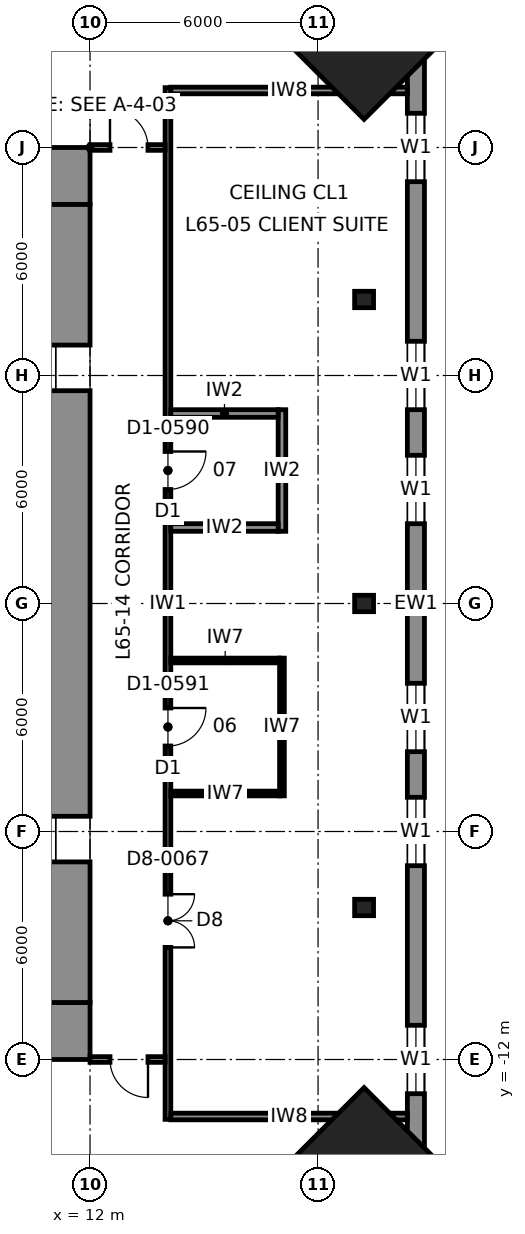
"""IFC4 building model, lengths in metres.
Left out: names, types, materials, properties, quantities, classifications, styles, units other than length and angle.
Written with IfcOpenShell. Run it as: python <this file> out.ifc"""

import sys

from ifc_helpers import new_model, si_unit, direction, frame, frame_2d, origin, origin_2d, place, context, subcontext, project, spatial, rectangle, i_section, extrude, element, fill, save


model = new_model("IFC4")
c1 = context("Model", 3, precision=1e-05, world=origin(), true_north=direction((0.0, 1.0)))
c2 = subcontext(c1, "Body", "Model", "MODEL_VIEW")
j1 = project(units=[si_unit("LENGTHUNIT", "METRE"), si_unit("PLANEANGLEUNIT", "RADIAN")], contexts=[c1])
p1 = place(None, origin())
s1 = spatial("IfcSite", under=j1, at=p1, CompositionType="ELEMENT")
p2 = place(p1, origin())
s2 = spatial("IfcBuilding", under=s1, at=p2, CompositionType="ELEMENT")
p3 = place(p2, frame((0.0, 0.0, 289.8)))
s3 = spatial("IfcBuildingStorey", under=s2, at=p3, CompositionType="ELEMENT", Elevation=289.8)
for number, where, z_axis, x_axis in (
    (1, (19.211, 14.861, 0.0), (-0.04, -0.04, 0.998), (0.708, -0.707, 0.0)),
    (2, (19.211, -14.861, 0.0), (-0.04, 0.04, 0.998), (-0.708, -0.707, 0.0)),
):
    element("IfcColumn", number, at=place(p3, frame(where, z_axis=z_axis, x_axis=x_axis)), inside=s3, PredefinedType="COLUMN", context=c2, shape_type="SweptSolid", body=[
        extrude(rectangle(XDim=3.0, YDim=3.0, at=origin_2d()), origin(), (0.0, 0.0, 1.0), 4.007),
    ])
for number, where, z_axis, x_axis in (
    (3, (19.211, 0.0, 0.0), (-0.04, 0.0, 0.999), (0.0, -1.0, 0.0)),
    (4, (19.211, -8.0, 0.0), (-0.04, 0.0, 0.999), (0.0, -1.0, 0.0)),
    (5, (19.211, 8.0, 0.0), (-0.04, 0.0, 0.999), (0.0, -1.0, 0.0)),
):
    element("IfcColumn", number, at=place(p3, frame(where, z_axis=z_axis, x_axis=x_axis)), inside=s3, PredefinedType="COLUMN", context=c2, shape_type="SweptSolid", body=[
        extrude(i_section(OverallWidth=0.432, OverallDepth=0.498, WebThickness=0.056, FlangeThickness=0.089, at=origin_2d()), origin(), (0.0, 0.0, 1.0), 4.003),
    ])
for number, where, z_axis, x_axis in (
    (6, (-12.0, 11.25, 0.0), (0.0, 0.0, 1.0), (1.0, 0.0, 0.0)),
    (7, (12.0, -11.25, 0.0), (0.0, 0.0, 1.0), (-1.0, 0.0, 0.0)),
):
    element("IfcWall", number, at=place(p3, frame(where, z_axis=z_axis, x_axis=x_axis)), inside=s3, PredefinedType="SHEAR", context=c2, shape_type="SweptSolid", body=[
        extrude(rectangle(XDim=24.0, YDim=1.5, at=frame_2d((12.0, 0.0))), origin(), (0.0, 0.0, 1.0), 4.0),
    ])
p4 = place(p3, frame((11.25, 10.5, 0.0), z_axis=(0.0, 0.0, 1.0), x_axis=(0.0, -1.0, 0.0)))
e8 = element("IfcWall", 8, at=p4, inside=s3, PredefinedType="SHEAR", context=c2, shape_type="SweptSolid", body=[
    extrude(rectangle(XDim=21.0, YDim=1.5, at=frame_2d((10.5, 0.0))), origin(), (0.0, 0.0, 1.0), 4.0),
])
p5 = place(p4, frame((3.7, 0.0, 0.0)))
e9 = element("IfcOpeningElement", 9, at=p5, cuts=e8, PredefinedType="OPENING", context=c2, shape_type="SweptSolid", body=[
    extrude(rectangle(XDim=1.2, YDim=2.3, at=frame_2d((0.6, 1.15))), frame((0.0, 0.76, 0.0), z_axis=(0.0, -1.0, 0.0), x_axis=(1.0, 0.0, 0.0)), (0.0, 0.0, 1.0), 1.52),
])
p6 = place(p4, frame((16.1, 0.0, 0.0)))
e10 = element("IfcOpeningElement", 10, at=p6, cuts=e8, PredefinedType="OPENING", context=c2, shape_type="SweptSolid", body=[
    extrude(rectangle(XDim=1.2, YDim=2.3, at=frame_2d((0.6, 1.15))), frame((0.0, 0.76, 0.0), z_axis=(0.0, -1.0, 0.0), x_axis=(1.0, 0.0, 0.0)), (0.0, 0.0, 1.0), 1.52),
])
p7 = place(p3, frame((20.575, -16.3, 0.0), z_axis=(0.0, 0.0, 1.0), x_axis=(0.0, 1.0, 0.0)))
e11 = element("IfcWall", 11, at=p7, inside=s3, PredefinedType="SOLIDWALL", context=c2, shape_type="SweptSolid", body=[
    extrude(rectangle(XDim=32.6, YDim=0.45, at=frame_2d((16.3, 0.0))), origin(), (0.0, 0.0, 1.0), 3.83),
])
p8 = place(p7, frame((3.4, 0.0, 0.7)))
e12 = element("IfcOpeningElement", 12, at=p8, cuts=e11, PredefinedType="OPENING", context=c2, shape_type="SweptSolid", body=[
    extrude(rectangle(XDim=1.8, YDim=2.6, at=frame_2d((0.9, 1.3))), frame((0.0, 0.235, 0.0), z_axis=(0.0, -1.0, 0.0), x_axis=(1.0, 0.0, 0.0)), (0.0, 0.0, 1.0), 0.47),
])
p9 = place(p7, frame((9.4, 0.0, 0.7)))
e13 = element("IfcOpeningElement", 13, at=p9, cuts=e11, PredefinedType="OPENING", context=c2, shape_type="SweptSolid", body=[
    extrude(rectangle(XDim=1.8, YDim=2.6, at=frame_2d((0.9, 1.3))), frame((0.0, 0.235, 0.0), z_axis=(0.0, -1.0, 0.0), x_axis=(1.0, 0.0, 0.0)), (0.0, 0.0, 1.0), 0.47),
])
p10 = place(p7, frame((12.4, 0.0, 0.7)))
e14 = element("IfcOpeningElement", 14, at=p10, cuts=e11, PredefinedType="OPENING", context=c2, shape_type="SweptSolid", body=[
    extrude(rectangle(XDim=1.8, YDim=2.6, at=frame_2d((0.9, 1.3))), frame((0.0, 0.235, 0.0), z_axis=(0.0, -1.0, 0.0), x_axis=(1.0, 0.0, 0.0)), (0.0, 0.0, 1.0), 0.47),
])
p11 = place(p7, frame((18.4, 0.0, 0.7)))
e15 = element("IfcOpeningElement", 15, at=p11, cuts=e11, PredefinedType="OPENING", context=c2, shape_type="SweptSolid", body=[
    extrude(rectangle(XDim=1.8, YDim=2.6, at=frame_2d((0.9, 1.3))), frame((0.0, 0.235, 0.0), z_axis=(0.0, -1.0, 0.0), x_axis=(1.0, 0.0, 0.0)), (0.0, 0.0, 1.0), 0.47),
])
p12 = place(p7, frame((21.4, 0.0, 0.7)))
e16 = element("IfcOpeningElement", 16, at=p12, cuts=e11, PredefinedType="OPENING", context=c2, shape_type="SweptSolid", body=[
    extrude(rectangle(XDim=1.8, YDim=2.6, at=frame_2d((0.9, 1.3))), frame((0.0, 0.235, 0.0), z_axis=(0.0, -1.0, 0.0), x_axis=(1.0, 0.0, 0.0)), (0.0, 0.0, 1.0), 0.47),
])
p13 = place(p7, frame((27.4, 0.0, 0.7)))
e17 = element("IfcOpeningElement", 17, at=p13, cuts=e11, PredefinedType="OPENING", context=c2, shape_type="SweptSolid", body=[
    extrude(rectangle(XDim=1.8, YDim=2.6, at=frame_2d((0.9, 1.3))), frame((0.0, 0.235, 0.0), z_axis=(0.0, -1.0, 0.0), x_axis=(1.0, 0.0, 0.0)), (0.0, 0.0, 1.0), 0.47),
])
p14 = place(p3, frame((14.05, -13.575, 0.0), z_axis=(0.0, 0.0, 1.0), x_axis=(0.0, 1.0, 0.0)))
e18 = element("IfcWall", 18, at=p14, inside=s3, PredefinedType="PARTITIONING", context=c2, shape_type="SweptSolid", body=[
    extrude(rectangle(XDim=27.15, YDim=0.15, at=frame_2d((13.575, 0.0))), origin(), (0.0, 0.0, 1.0), 3.83),
])
p15 = place(p14, frame((4.525, 0.0, 0.0)))
e19 = element("IfcOpeningElement", 19, at=p15, cuts=e18, PredefinedType="OPENING", context=c2, shape_type="SweptSolid", body=[
    extrude(rectangle(XDim=1.4, YDim=2.3, at=frame_2d((0.7, 1.15))), frame((0.0, 0.085, 0.0), z_axis=(0.0, -1.0, 0.0), x_axis=(1.0, 0.0, 0.0)), (0.0, 0.0, 1.0), 0.17),
])
p16 = place(p14, frame((9.825, 0.0, 0.0)))
e20 = element("IfcOpeningElement", 20, at=p16, cuts=e18, PredefinedType="OPENING", context=c2, shape_type="SweptSolid", body=[
    extrude(rectangle(XDim=1.0, YDim=2.3, at=frame_2d((0.5, 1.15))), frame((0.0, 0.085, 0.0), z_axis=(0.0, -1.0, 0.0), x_axis=(1.0, 0.0, 0.0)), (0.0, 0.0, 1.0), 0.17),
])
p17 = place(p14, frame((16.575, 0.0, 0.0)))
e21 = element("IfcOpeningElement", 21, at=p17, cuts=e18, PredefinedType="OPENING", context=c2, shape_type="SweptSolid", body=[
    extrude(rectangle(XDim=1.0, YDim=2.3, at=frame_2d((0.5, 1.15))), frame((0.0, 0.085, 0.0), z_axis=(0.0, -1.0, 0.0), x_axis=(1.0, 0.0, 0.0)), (0.0, 0.0, 1.0), 0.17),
])
p18 = place(p3, frame((12.0, 12.0, 0.0), z_axis=(0.0, 0.0, 1.0), x_axis=(1.0, 0.0, 0.0)))
e22 = element("IfcWall", 22, at=p18, inside=s3, PredefinedType="PARTITIONING", context=c2, shape_type="SweptSolid", body=[
    extrude(rectangle(XDim=1.975, YDim=0.15, at=frame_2d((0.988, 0.0))), origin(), (0.0, 0.0, 1.0), 3.83),
])
p19 = place(p18, frame((0.525, 0.0, 0.0)))
e23 = element("IfcOpeningElement", 23, at=p19, cuts=e22, PredefinedType="OPENING", context=c2, shape_type="SweptSolid", body=[
    extrude(rectangle(XDim=1.0, YDim=2.3, at=frame_2d((0.5, 1.15))), frame((0.0, 0.085, 0.0), z_axis=(0.0, -1.0, 0.0), x_axis=(1.0, 0.0, 0.0)), (0.0, 0.0, 1.0), 0.17),
])
p20 = place(p3, frame((13.975, -12.0, 0.0), z_axis=(0.0, 0.0, 1.0), x_axis=(-1.0, 0.0, 0.0)))
e24 = element("IfcWall", 24, at=p20, inside=s3, PredefinedType="PARTITIONING", context=c2, shape_type="SweptSolid", body=[
    extrude(rectangle(XDim=1.975, YDim=0.15, at=frame_2d((0.988, 0.0))), origin(), (0.0, 0.0, 1.0), 3.83),
])
p21 = place(p20, frame((0.45, 0.0, 0.0)))
e25 = element("IfcOpeningElement", 25, at=p21, cuts=e24, PredefinedType="OPENING", context=c2, shape_type="SweptSolid", body=[
    extrude(rectangle(XDim=1.0, YDim=2.3, at=frame_2d((0.5, 1.15))), frame((0.0, 0.085, 0.0), z_axis=(0.0, -1.0, 0.0), x_axis=(1.0, 0.0, 0.0)), (0.0, 0.0, 1.0), 0.17),
])
for number, where, z_axis, x_axis in (
    (26, (14.125, 13.5, 0.0), (0.0, 0.0, 1.0), (1.0, 0.0, 0.0)),
    (27, (20.35, -13.5, 0.0), (0.0, 0.0, 1.0), (-1.0, 0.0, 0.0)),
):
    element("IfcWall", number, at=place(p3, frame(where, z_axis=z_axis, x_axis=x_axis)), inside=s3, PredefinedType="PARTITIONING", context=c2, shape_type="SweptSolid", body=[
        extrude(rectangle(XDim=6.225, YDim=0.175, at=frame_2d((3.113, 0.0))), origin(), (0.0, 0.0, 1.0), 3.83),
    ])
p22 = place(p3, frame((17.05, -5.062, 0.0), z_axis=(0.0, 0.0, 1.0), x_axis=(0.0, 1.0, 0.0)))
e28 = element("IfcWall", 28, at=p22, inside=s3, PredefinedType="PARTITIONING", context=c2, shape_type="SweptSolid", body=[
    extrude(rectangle(XDim=3.625, YDim=0.125, at=frame_2d((1.812, 0.0))), origin(), (0.0, 0.0, 1.0), 3.83),
])
for number, where, z_axis, x_axis in (
    (29, (14.125, -5.0, 0.0), (0.0, 0.0, 1.0), (1.0, 0.0, 0.0)),
    (30, (14.125, -1.5, 0.0), (0.0, 0.0, 1.0), (1.0, 0.0, 0.0)),
):
    element("IfcWall", number, at=place(p3, frame(where, z_axis=z_axis, x_axis=x_axis)), inside=s3, PredefinedType="PARTITIONING", context=c2, shape_type="SweptSolid", body=[
        extrude(rectangle(XDim=2.863, YDim=0.125, at=frame_2d((1.431, 0.0))), origin(), (0.0, 0.0, 1.0), 3.83),
    ])
p23 = place(p3, frame((17.05, 1.9, 0.0), z_axis=(0.0, 0.0, 1.0), x_axis=(0.0, 1.0, 0.0)))
e31 = element("IfcWall", 31, at=p23, inside=s3, PredefinedType="PARTITIONING", context=c2, shape_type="SweptSolid", body=[
    extrude(rectangle(XDim=3.2, YDim=0.2, at=frame_2d((1.6, 0.0))), origin(), (0.0, 0.0, 1.0), 3.83),
])
for number, where, z_axis, x_axis in (
    (32, (14.125, 2.0, 0.0), (0.0, 0.0, 1.0), (1.0, 0.0, 0.0)),
    (33, (14.125, 5.0, 0.0), (0.0, 0.0, 1.0), (1.0, 0.0, 0.0)),
):
    element("IfcWall", number, at=place(p3, frame(where, z_axis=z_axis, x_axis=x_axis)), inside=s3, PredefinedType="PARTITIONING", context=c2, shape_type="SweptSolid", body=[
        extrude(rectangle(XDim=2.825, YDim=0.2, at=frame_2d((1.413, 0.0))), origin(), (0.0, 0.0, 1.0), 3.83),
    ])
p24 = place(p8, origin())
e34 = element("IfcWindow", 34, at=p24, inside=s3, PartitioningType="SINGLE_PANEL", PredefinedType="WINDOW", context=c2, shape_type="SweptSolid", body=[
    extrude(rectangle(XDim=1.8, YDim=2.6, at=frame_2d((0.9, 1.3))), frame((0.0, 0.03, 0.0), z_axis=(0.0, -1.0, 0.0), x_axis=(1.0, 0.0, 0.0)), (0.0, 0.0, 1.0), 0.06),
])
fill(e12, e34)
p25 = place(p9, origin())
e35 = element("IfcWindow", 35, at=p25, inside=s3, PartitioningType="SINGLE_PANEL", PredefinedType="WINDOW", context=c2, shape_type="SweptSolid", body=[
    extrude(rectangle(XDim=1.8, YDim=2.6, at=frame_2d((0.9, 1.3))), frame((0.0, 0.03, 0.0), z_axis=(0.0, -1.0, 0.0), x_axis=(1.0, 0.0, 0.0)), (0.0, 0.0, 1.0), 0.06),
])
fill(e13, e35)
p26 = place(p10, origin())
e36 = element("IfcWindow", 36, at=p26, inside=s3, PartitioningType="SINGLE_PANEL", PredefinedType="WINDOW", context=c2, shape_type="SweptSolid", body=[
    extrude(rectangle(XDim=1.8, YDim=2.6, at=frame_2d((0.9, 1.3))), frame((0.0, 0.03, 0.0), z_axis=(0.0, -1.0, 0.0), x_axis=(1.0, 0.0, 0.0)), (0.0, 0.0, 1.0), 0.06),
])
fill(e14, e36)
p27 = place(p11, origin())
e37 = element("IfcWindow", 37, at=p27, inside=s3, PartitioningType="SINGLE_PANEL", PredefinedType="WINDOW", context=c2, shape_type="SweptSolid", body=[
    extrude(rectangle(XDim=1.8, YDim=2.6, at=frame_2d((0.9, 1.3))), frame((0.0, 0.03, 0.0), z_axis=(0.0, -1.0, 0.0), x_axis=(1.0, 0.0, 0.0)), (0.0, 0.0, 1.0), 0.06),
])
fill(e15, e37)
p28 = place(p12, origin())
e38 = element("IfcWindow", 38, at=p28, inside=s3, PartitioningType="SINGLE_PANEL", PredefinedType="WINDOW", context=c2, shape_type="SweptSolid", body=[
    extrude(rectangle(XDim=1.8, YDim=2.6, at=frame_2d((0.9, 1.3))), frame((0.0, 0.03, 0.0), z_axis=(0.0, -1.0, 0.0), x_axis=(1.0, 0.0, 0.0)), (0.0, 0.0, 1.0), 0.06),
])
fill(e16, e38)
p29 = place(p13, origin())
e39 = element("IfcWindow", 39, at=p29, inside=s3, PartitioningType="SINGLE_PANEL", PredefinedType="WINDOW", context=c2, shape_type="SweptSolid", body=[
    extrude(rectangle(XDim=1.8, YDim=2.6, at=frame_2d((0.9, 1.3))), frame((0.0, 0.03, 0.0), z_axis=(0.0, -1.0, 0.0), x_axis=(1.0, 0.0, 0.0)), (0.0, 0.0, 1.0), 0.06),
])
fill(e17, e39)
p30 = place(p19, origin())
e40 = element("IfcDoor", 40, at=p30, inside=s3, OperationType="SINGLE_SWING_LEFT", PredefinedType="DOOR", context=c2, shape_type="SweptSolid", body=[
    extrude(rectangle(XDim=1.0, YDim=2.3, at=frame_2d((0.5, 1.15))), frame((0.0, 0.025, 0.0), z_axis=(0.0, -1.0, 0.0), x_axis=(1.0, 0.0, 0.0)), (0.0, 0.0, 1.0), 0.05),
])
fill(e23, e40)
p31 = place(p21, origin())
e41 = element("IfcDoor", 41, at=p31, inside=s3, OperationType="SINGLE_SWING_LEFT", PredefinedType="DOOR", context=c2, shape_type="SweptSolid", body=[
    extrude(rectangle(XDim=1.0, YDim=2.3, at=frame_2d((0.5, 1.15))), frame((0.0, 0.025, 0.0), z_axis=(0.0, -1.0, 0.0), x_axis=(1.0, 0.0, 0.0)), (0.0, 0.0, 1.0), 0.05),
])
fill(e25, e41)
p32 = place(p15, frame((1.4, 0.0, 0.0), z_axis=(0.0, 0.0, 1.0), x_axis=(-1.0, 0.0, 0.0)))
e42 = element("IfcDoor", 42, at=p32, inside=s3, OperationType="DOUBLE_DOOR_SINGLE_SWING", PredefinedType="DOOR", context=c2, shape_type="SweptSolid", body=[
    extrude(rectangle(XDim=1.4, YDim=2.3, at=frame_2d((0.7, 1.15))), frame((0.0, 0.025, 0.0), z_axis=(0.0, -1.0, 0.0), x_axis=(1.0, 0.0, 0.0)), (0.0, 0.0, 1.0), 0.05),
])
fill(e19, e42)
p33 = place(p16, frame((1.0, 0.0, 0.0), z_axis=(0.0, 0.0, 1.0), x_axis=(-1.0, 0.0, 0.0)))
e43 = element("IfcDoor", 43, at=p33, inside=s3, OperationType="SINGLE_SWING_LEFT", PredefinedType="DOOR", context=c2, shape_type="SweptSolid", body=[
    extrude(rectangle(XDim=1.0, YDim=2.3, at=frame_2d((0.5, 1.15))), frame((0.0, 0.025, 0.0), z_axis=(0.0, -1.0, 0.0), x_axis=(1.0, 0.0, 0.0)), (0.0, 0.0, 1.0), 0.05),
])
fill(e20, e43)
p34 = place(p17, frame((1.0, 0.0, 0.0), z_axis=(0.0, 0.0, 1.0), x_axis=(-1.0, 0.0, 0.0)))
e44 = element("IfcDoor", 44, at=p34, inside=s3, OperationType="SINGLE_SWING_LEFT", PredefinedType="DOOR", context=c2, shape_type="SweptSolid", body=[
    extrude(rectangle(XDim=1.0, YDim=2.3, at=frame_2d((0.5, 1.15))), frame((0.0, 0.025, 0.0), z_axis=(0.0, -1.0, 0.0), x_axis=(1.0, 0.0, 0.0)), (0.0, 0.0, 1.0), 0.05),
])
fill(e21, e44)
p35 = place(p5, frame((1.2, 0.0, 0.0), z_axis=(0.0, 0.0, 1.0), x_axis=(-1.0, 0.0, 0.0)))
e45 = element("IfcDoor", 45, at=p35, inside=s3, OperationType="SINGLE_SWING_LEFT", PredefinedType="DOOR", context=c2, shape_type="SweptSolid", body=[
    extrude(rectangle(XDim=1.2, YDim=2.3, at=frame_2d((0.6, 1.15))), frame((0.0, 0.025, 0.0), z_axis=(0.0, -1.0, 0.0), x_axis=(1.0, 0.0, 0.0)), (0.0, 0.0, 1.0), 0.05),
])
fill(e9, e45)
p36 = place(p6, frame((1.2, 0.0, 0.0), z_axis=(0.0, 0.0, 1.0), x_axis=(-1.0, 0.0, 0.0)))
e46 = element("IfcDoor", 46, at=p36, inside=s3, OperationType="SINGLE_SWING_LEFT", PredefinedType="DOOR", context=c2, shape_type="SweptSolid", body=[
    extrude(rectangle(XDim=1.2, YDim=2.3, at=frame_2d((0.6, 1.15))), frame((0.0, 0.025, 0.0), z_axis=(0.0, -1.0, 0.0), x_axis=(1.0, 0.0, 0.0)), (0.0, 0.0, 1.0), 0.05),
])
fill(e10, e46)
save(model, sys.argv[1])
